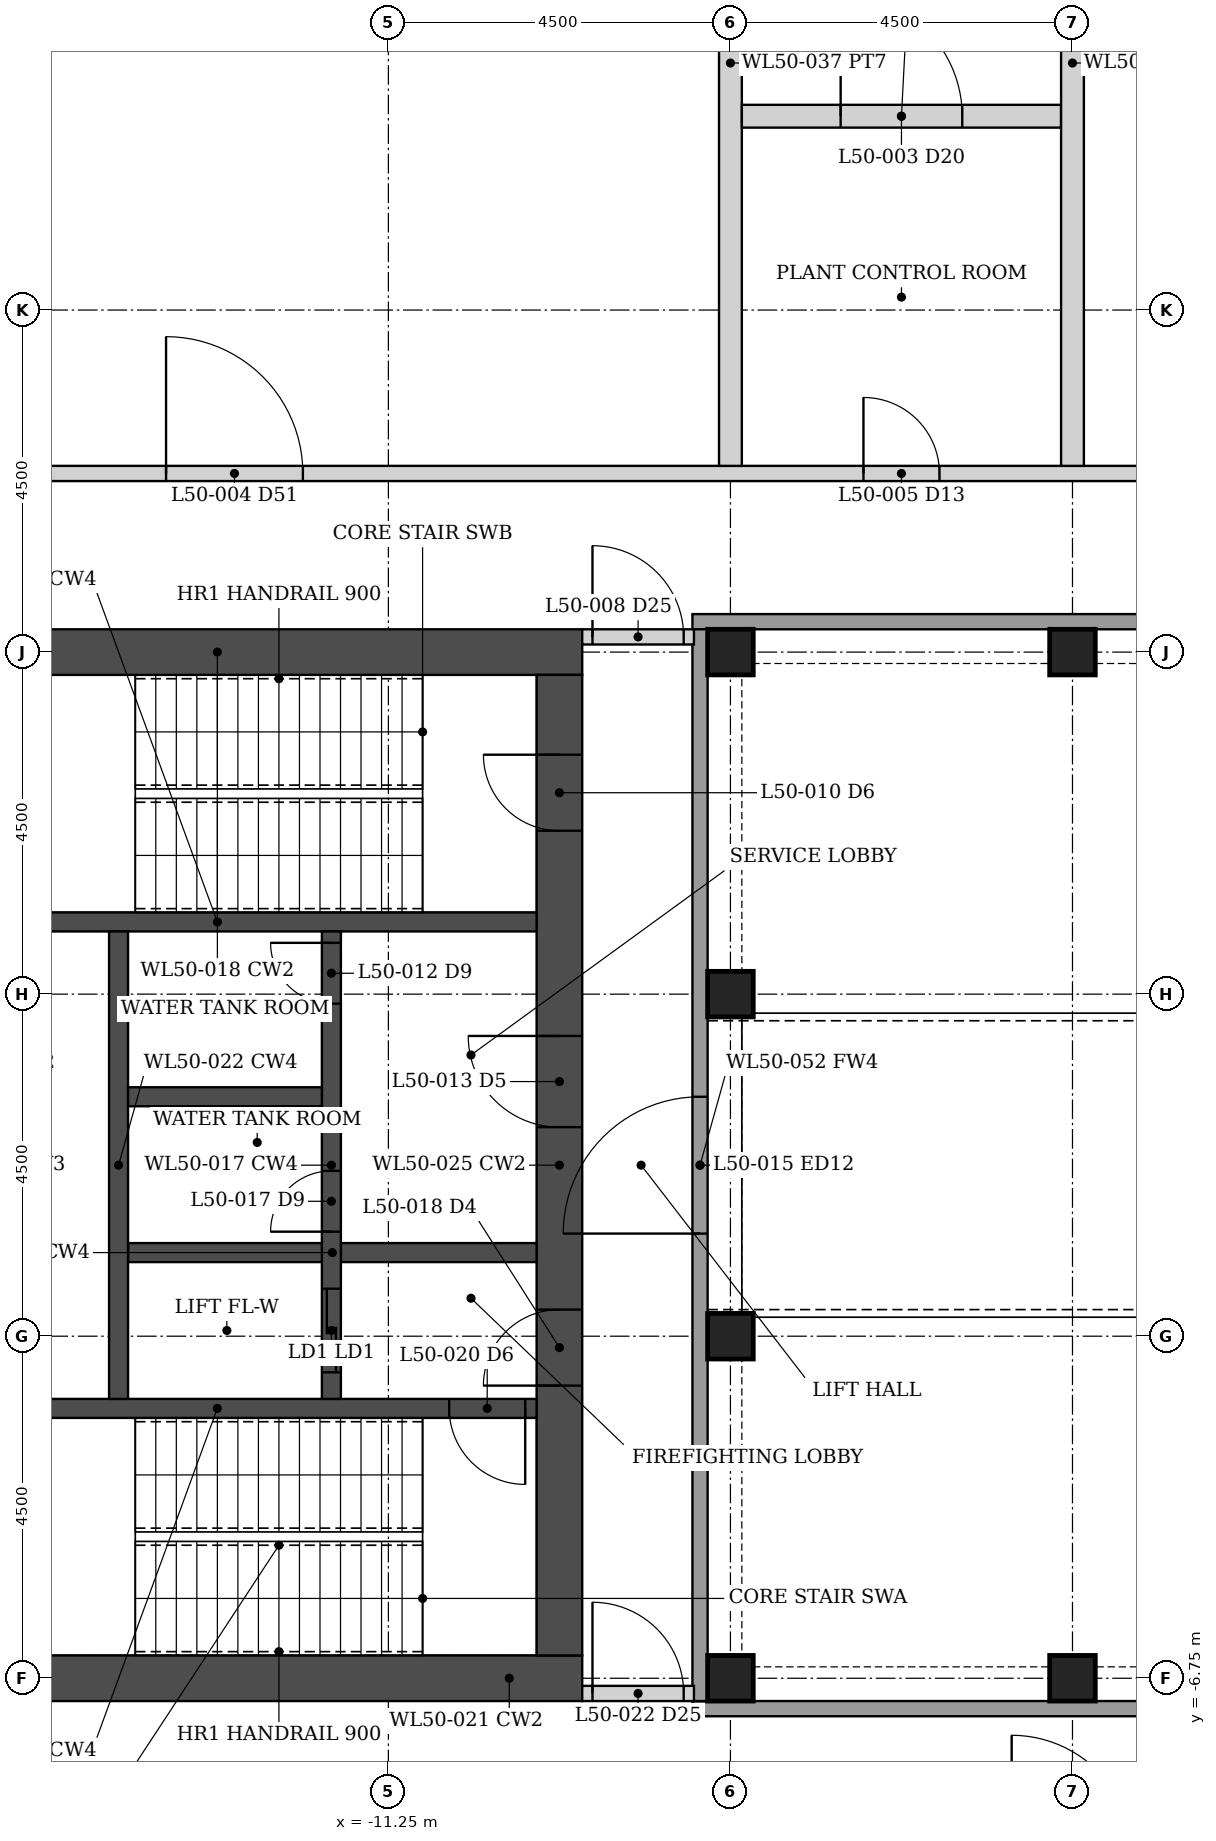
"""IFC4 building model, lengths in metres.
Left out: names, types, materials, properties, quantities, classifications, styles, units other than length and angle.
Written with IfcOpenShell. Run it as: python <this file> out.ifc"""

import sys

from ifc_helpers import new_model, si_unit, direction, frame, frame_2d, origin, origin_2d, place, context, subcontext, project, spatial, rectangle, hollow_rectangle, extrude, element, fill, save


model = new_model("IFC4")
c1 = context("Model", 3, precision=1e-05, world=origin(), true_north=direction((0.0, 1.0)))
c2 = subcontext(c1, "Body", "Model", "MODEL_VIEW")
j1 = project(units=[si_unit("LENGTHUNIT", "METRE"), si_unit("PLANEANGLEUNIT", "RADIAN")], contexts=[c1])
p1 = place(None, origin())
s1 = spatial("IfcSite", under=j1, at=p1, CompositionType="ELEMENT")
p2 = place(p1, origin())
s2 = spatial("IfcBuilding", under=s1, at=p2, CompositionType="ELEMENT")
p3 = place(p2, frame((0.0, 0.0, 190.4)))
s3 = spatial("IfcBuildingStorey", under=s2, at=p3, CompositionType="ELEMENT", Elevation=190.4)
for number, where, z_axis, x_axis in (
    (1, (-6.75, -6.75, 0.0), (0.0, 0.0, 1.0), (1.0, 0.0, 0.0)),
    (2, (-6.75, -2.25, 0.0), (0.0, 0.0, 1.0), (1.0, 0.0, 0.0)),
    (3, (-6.75, 2.25, 0.0), (0.0, 0.0, 1.0), (1.0, 0.0, 0.0)),
    (4, (-6.75, 6.75, 0.0), (0.0, 0.0, 1.0), (1.0, 0.0, 0.0)),
    (5, (-2.25, -6.75, 0.0), (0.0, 0.0, 1.0), (1.0, 0.0, 0.0)),
    (6, (-2.25, 6.75, 0.0), (0.0, 0.0, 1.0), (1.0, 0.0, 0.0)),
):
    element("IfcColumn", number, at=place(p3, frame(where, z_axis=z_axis, x_axis=x_axis)), inside=s3, PredefinedType="COLUMN", context=c2, shape_type="SweptSolid", body=[
        extrude(hollow_rectangle(XDim=0.6, YDim=0.6, WallThickness=0.03, at=origin_2d()), origin(), (0.0, 0.0, 1.0), 5.4),
    ])
for number, where, z_axis, x_axis in (
    (7, (-8.7, -6.75, 0.0), (0.0, 0.0, 1.0), (-1.0, 0.0, 0.0)),
    (8, (-8.7, 6.75, 0.0), (0.0, 0.0, 1.0), (-1.0, 0.0, 0.0)),
):
    element("IfcWall", number, at=place(p3, frame(where, z_axis=z_axis, x_axis=x_axis)), inside=s3, PredefinedType="SHEAR", context=c2, shape_type="SweptSolid", body=[
        extrude(rectangle(XDim=9.6, YDim=0.6, at=frame_2d((4.8, 0.0))), origin(), (0.0, 0.0, 1.0), 5.4),
    ])
p4 = place(p3, frame((-9.0, -6.45, 0.0), z_axis=(0.0, 0.0, 1.0), x_axis=(0.0, 1.0, 0.0)))
e9 = element("IfcWall", 9, at=p4, inside=s3, PredefinedType="SHEAR", context=c2, shape_type="SweptSolid", body=[
    extrude(rectangle(XDim=12.9, YDim=0.6, at=frame_2d((6.45, 0.0))), origin(), (0.0, 0.0, 1.0), 5.4),
])
p5 = place(p4, frame((3.55, 0.0, 0.0)))
e10 = element("IfcOpeningElement", 10, at=p5, cuts=e9, PredefinedType="OPENING", context=c2, shape_type="SweptSolid", body=[
    extrude(rectangle(XDim=1.0, YDim=2.1, at=frame_2d((0.5, 1.05))), frame((0.0, 0.31, 0.0), z_axis=(0.0, -1.0, 0.0), x_axis=(1.0, 0.0, 0.0)), (0.0, 0.0, 1.0), 0.62),
])
p6 = place(p4, frame((6.95, 0.0, 0.0)))
e11 = element("IfcOpeningElement", 11, at=p6, cuts=e9, PredefinedType="OPENING", context=c2, shape_type="SweptSolid", body=[
    extrude(rectangle(XDim=1.2, YDim=2.1, at=frame_2d((0.6, 1.05))), frame((0.0, 0.31, 0.0), z_axis=(0.0, -1.0, 0.0), x_axis=(1.0, 0.0, 0.0)), (0.0, 0.0, 1.0), 0.62),
])
p7 = place(p4, frame((10.85, 0.0, 0.0)))
e12 = element("IfcOpeningElement", 12, at=p7, cuts=e9, PredefinedType="OPENING", context=c2, shape_type="SweptSolid", body=[
    extrude(rectangle(XDim=1.0, YDim=2.1, at=frame_2d((0.5, 1.05))), frame((0.0, 0.31, 0.0), z_axis=(0.0, -1.0, 0.0), x_axis=(1.0, 0.0, 0.0)), (0.0, 0.0, 1.0), 0.62),
])
p8 = place(p3, frame((-9.3, -3.2, 0.0), z_axis=(0.0, 0.0, 1.0), x_axis=(-1.0, 0.0, 0.0)))
e13 = element("IfcWall", 13, at=p8, inside=s3, PredefinedType="SHEAR", context=c2, shape_type="SweptSolid", body=[
    extrude(rectangle(XDim=8.4, YDim=0.25, at=frame_2d((4.2, 0.0))), origin(), (0.0, 0.0, 1.0), 5.4),
])
p9 = place(p8, frame((0.15, 0.0, 0.0)))
e14 = element("IfcOpeningElement", 14, at=p9, cuts=e13, PredefinedType="OPENING", context=c2, shape_type="SweptSolid", body=[
    extrude(rectangle(XDim=1.0, YDim=2.1, at=frame_2d((0.5, 1.05))), frame((0.0, 0.135, 0.0), z_axis=(0.0, -1.0, 0.0), x_axis=(1.0, 0.0, 0.0)), (0.0, 0.0, 1.0), 0.27),
])
p10 = place(p3, frame((-9.3, 3.2, 0.0), z_axis=(0.0, 0.0, 1.0), x_axis=(-1.0, 0.0, 0.0)))
e15 = element("IfcWall", 15, at=p10, inside=s3, PredefinedType="SHEAR", context=c2, shape_type="SweptSolid", body=[
    extrude(rectangle(XDim=8.4, YDim=0.25, at=frame_2d((4.2, 0.0))), origin(), (0.0, 0.0, 1.0), 5.4),
])
p11 = place(p3, frame((-9.3, -1.15, 0.0), z_axis=(0.0, 0.0, 1.0), x_axis=(-1.0, 0.0, 0.0)))
e16 = element("IfcWall", 16, at=p11, inside=s3, PredefinedType="SHEAR", context=c2, shape_type="SweptSolid", body=[
    extrude(rectangle(XDim=5.375, YDim=0.25, at=frame_2d((2.688, 0.0))), origin(), (0.0, 0.0, 1.0), 5.4),
])
p12 = place(p3, frame((-12.0, -3.075, 0.0), z_axis=(0.0, 0.0, 1.0), x_axis=(0.0, 1.0, 0.0)))
e17 = element("IfcWall", 17, at=p12, inside=s3, PredefinedType="SHEAR", context=c2, shape_type="SweptSolid", body=[
    extrude(rectangle(XDim=6.15, YDim=0.25, at=frame_2d((3.075, 0.0))), origin(), (0.0, 0.0, 1.0), 5.4),
])
p13 = place(p12, frame((2.2, 0.0, 0.0)))
e18 = element("IfcOpeningElement", 18, at=p13, cuts=e17, PredefinedType="OPENING", context=c2, shape_type="SweptSolid", body=[
    extrude(rectangle(XDim=0.8, YDim=2.1, at=frame_2d((0.4, 1.05))), frame((0.0, 0.135, 0.0), z_axis=(0.0, -1.0, 0.0), x_axis=(1.0, 0.0, 0.0)), (0.0, 0.0, 1.0), 0.27),
])
p14 = place(p12, frame((5.2, 0.0, 0.0)))
e19 = element("IfcOpeningElement", 19, at=p14, cuts=e17, PredefinedType="OPENING", context=c2, shape_type="SweptSolid", body=[
    extrude(rectangle(XDim=0.8, YDim=2.1, at=frame_2d((0.4, 1.05))), frame((0.0, 0.135, 0.0), z_axis=(0.0, -1.0, 0.0), x_axis=(1.0, 0.0, 0.0)), (0.0, 0.0, 1.0), 0.27),
])
p15 = place(p12, frame((0.35, 0.0, 0.0)))
e20 = element("IfcOpeningElement", 20, at=p15, cuts=e17, PredefinedType="OPENING", context=c2, shape_type="SweptSolid", body=[
    extrude(rectangle(XDim=1.1, YDim=2.1, at=frame_2d((0.55, 1.05))), frame((0.0, 0.135, 0.0), z_axis=(0.0, -1.0, 0.0), x_axis=(1.0, 0.0, 0.0)), (0.0, 0.0, 1.0), 0.27),
])
p16 = place(p3, frame((-14.8, -3.075, 0.0), z_axis=(0.0, 0.0, 1.0), x_axis=(0.0, 1.0, 0.0)))
e21 = element("IfcWall", 21, at=p16, inside=s3, PredefinedType="SHEAR", context=c2, shape_type="SweptSolid", body=[
    extrude(rectangle(XDim=6.15, YDim=0.25, at=frame_2d((3.075, 0.0))), origin(), (0.0, 0.0, 1.0), 5.4),
])
p17 = place(p3, frame((-12.125, 0.9, 0.0), z_axis=(0.0, 0.0, 1.0), x_axis=(-1.0, 0.0, 0.0)))
e22 = element("IfcWall", 22, at=p17, inside=s3, PredefinedType="SHEAR", context=c2, shape_type="SweptSolid", body=[
    extrude(rectangle(XDim=2.55, YDim=0.25, at=frame_2d((1.275, 0.0))), origin(), (0.0, 0.0, 1.0), 5.4),
])
p18 = place(p3, frame((-19.9, 11.105, 0.0), z_axis=(0.0, 0.0, 1.0), x_axis=(0.707106781187, 0.707106781187, 0.0)))
e23 = element("IfcWall", 23, at=p18, inside=s3, PredefinedType="SOLIDWALL", context=c2, shape_type="SweptSolid", body=[
    extrude(rectangle(XDim=12.438, YDim=0.2, at=frame_2d((6.219, 0.0))), origin(), (0.0, 0.0, 1.0), 4.299),
])
for number, where, z_axis, x_axis in (
    (24, (-7.25, 7.15, 0.0), (0.0, 0.0, 1.0), (1.0, 0.0, 0.0)),
    (25, (-7.25, -7.15, 0.0), (0.0, 0.0, 1.0), (1.0, 0.0, 0.0)),
):
    element("IfcWall", number, at=place(p3, frame(where, z_axis=z_axis, x_axis=x_axis)), inside=s3, PredefinedType="SOLIDWALL", context=c2, shape_type="SweptSolid", body=[
        extrude(rectangle(XDim=14.5, YDim=0.2, at=frame_2d((7.25, 0.0))), origin(), (0.0, 0.0, 1.0), 4.229),
    ])
p19 = place(p3, frame((-7.15, -7.05, 0.0), z_axis=(0.0, 0.0, 1.0), x_axis=(0.0, 1.0, 0.0)))
e26 = element("IfcWall", 26, at=p19, inside=s3, PredefinedType="SOLIDWALL", context=c2, shape_type="SweptSolid", body=[
    extrude(rectangle(XDim=14.1, YDim=0.2, at=frame_2d((7.05, 0.0))), origin(), (0.0, 0.0, 1.0), 4.229),
])
p20 = place(p19, frame((6.15, 0.0, 0.0)))
e27 = element("IfcOpeningElement", 27, at=p20, cuts=e26, PredefinedType="OPENING", context=c2, shape_type="SweptSolid", body=[
    extrude(rectangle(XDim=1.8, YDim=2.2, at=frame_2d((0.9, 1.1))), frame((0.0, 0.11, 0.0), z_axis=(0.0, -1.0, 0.0), x_axis=(1.0, 0.0, 0.0)), (0.0, 0.0, 1.0), 0.22),
])
p21 = place(p3, frame((-8.7, 6.95, 0.0), z_axis=(0.0, 0.0, 1.0), x_axis=(1.0, 0.0, 0.0)))
e28 = element("IfcWall", 28, at=p21, inside=s3, PredefinedType="PARTITIONING", context=c2, shape_type="SweptSolid", body=[
    extrude(rectangle(XDim=1.47, YDim=0.2, at=frame_2d((0.735, 0.0))), origin(), (0.0, 0.0, 1.0), 4.229),
])
p22 = place(p21, frame((0.135, 0.0, 0.0)))
e29 = element("IfcOpeningElement", 29, at=p22, cuts=e28, PredefinedType="OPENING", context=c2, shape_type="SweptSolid", body=[
    extrude(rectangle(XDim=1.2, YDim=2.1, at=frame_2d((0.6, 1.05))), frame((0.0, 0.11, 0.0), z_axis=(0.0, -1.0, 0.0), x_axis=(1.0, 0.0, 0.0)), (0.0, 0.0, 1.0), 0.22),
])
p23 = place(p3, frame((-8.7, -6.95, 0.0), z_axis=(0.0, 0.0, 1.0), x_axis=(1.0, 0.0, 0.0)))
e30 = element("IfcWall", 30, at=p23, inside=s3, PredefinedType="PARTITIONING", context=c2, shape_type="SweptSolid", body=[
    extrude(rectangle(XDim=1.47, YDim=0.2, at=frame_2d((0.735, 0.0))), origin(), (0.0, 0.0, 1.0), 4.229),
])
p24 = place(p23, frame((0.135, 0.0, 0.0)))
e31 = element("IfcOpeningElement", 31, at=p24, cuts=e30, PredefinedType="OPENING", context=c2, shape_type="SweptSolid", body=[
    extrude(rectangle(XDim=1.2, YDim=2.1, at=frame_2d((0.6, 1.05))), frame((0.0, 0.11, 0.0), z_axis=(0.0, -1.0, 0.0), x_axis=(1.0, 0.0, 0.0)), (0.0, 0.0, 1.0), 0.22),
])
p25 = place(p3, frame((-19.8, 9.1, 0.0), z_axis=(0.0, 0.0, 1.0), x_axis=(1.0, 0.0, 0.0)))
e32 = element("IfcWall", 32, at=p25, inside=s3, PredefinedType="PARTITIONING", context=c2, shape_type="SweptSolid", body=[
    extrude(rectangle(XDim=39.6, YDim=0.2, at=frame_2d((19.8, 0.0))), origin(), (0.0, 0.0, 1.0), 4.229),
])
p26 = place(p25, frame((5.625, 0.0, 0.0)))
e33 = element("IfcOpeningElement", 33, at=p26, cuts=e32, PredefinedType="OPENING", context=c2, shape_type="SweptSolid", body=[
    extrude(rectangle(XDim=1.8, YDim=2.1, at=frame_2d((0.9, 1.05))), frame((0.0, 0.11, 0.0), z_axis=(0.0, -1.0, 0.0), x_axis=(1.0, 0.0, 0.0)), (0.0, 0.0, 1.0), 0.22),
])
p27 = place(p25, frame((14.8, 0.0, 0.0)))
e34 = element("IfcOpeningElement", 34, at=p27, cuts=e32, PredefinedType="OPENING", context=c2, shape_type="SweptSolid", body=[
    extrude(rectangle(XDim=1.0, YDim=2.1, at=frame_2d((0.5, 1.05))), frame((0.0, 0.11, 0.0), z_axis=(0.0, -1.0, 0.0), x_axis=(1.0, 0.0, 0.0)), (0.0, 0.0, 1.0), 0.22),
])
p28 = place(p25, frame((21.25, 0.0, 0.0)))
e35 = element("IfcOpeningElement", 35, at=p28, cuts=e32, PredefinedType="OPENING", context=c2, shape_type="SweptSolid", body=[
    extrude(rectangle(XDim=1.6, YDim=2.4, at=frame_2d((0.8, 1.2))), frame((0.0, 0.11, 0.0), z_axis=(0.0, -1.0, 0.0), x_axis=(1.0, 0.0, 0.0)), (0.0, 0.0, 1.0), 0.22),
])
p29 = place(p25, frame((32.175, 0.0, 0.0)))
e36 = element("IfcOpeningElement", 36, at=p29, cuts=e32, PredefinedType="OPENING", context=c2, shape_type="SweptSolid", body=[
    extrude(rectangle(XDim=1.8, YDim=2.1, at=frame_2d((0.9, 1.05))), frame((0.0, 0.11, 0.0), z_axis=(0.0, -1.0, 0.0), x_axis=(1.0, 0.0, 0.0)), (0.0, 0.0, 1.0), 0.22),
])
p30 = place(p3, frame((-6.75, 9.2, 0.0), z_axis=(0.0, 0.0, 1.0), x_axis=(0.0, 1.0, 0.0)))
e37 = element("IfcWall", 37, at=p30, inside=s3, PredefinedType="PARTITIONING", context=c2, shape_type="SweptSolid", body=[
    extrude(rectangle(XDim=10.6, YDim=0.3, at=frame_2d((5.3, 0.0))), origin(), (0.0, 0.0, 1.0), 4.229),
])
p31 = place(p3, frame((-6.6, 13.8, 0.0), z_axis=(0.0, 0.0, 1.0), x_axis=(1.0, 0.0, 0.0)))
e38 = element("IfcWall", 38, at=p31, inside=s3, PredefinedType="PARTITIONING", context=c2, shape_type="SweptSolid", body=[
    extrude(rectangle(XDim=4.2, YDim=0.3, at=frame_2d((2.1, 0.0))), origin(), (0.0, 0.0, 1.0), 4.229),
])
p32 = place(p31, frame((1.3, 0.0, 0.0)))
e39 = element("IfcOpeningElement", 39, at=p32, cuts=e38, PredefinedType="OPENING", context=c2, shape_type="SweptSolid", body=[
    extrude(rectangle(XDim=1.6, YDim=2.4, at=frame_2d((0.8, 1.2))), frame((0.0, 0.16, 0.0), z_axis=(0.0, -1.0, 0.0), x_axis=(1.0, 0.0, 0.0)), (0.0, 0.0, 1.0), 0.32),
])
p33 = place(p3, frame((-2.25, 9.2, 0.0), z_axis=(0.0, 0.0, 1.0), x_axis=(0.0, 1.0, 0.0)))
e40 = element("IfcWall", 40, at=p33, inside=s3, PredefinedType="PARTITIONING", context=c2, shape_type="SweptSolid", body=[
    extrude(rectangle(XDim=10.6, YDim=0.3, at=frame_2d((5.3, 0.0))), origin(), (0.0, 0.0, 1.0), 4.229),
])
p34 = place(p20, origin())
e41 = element("IfcDoor", 41, at=p34, inside=s3, OperationType="DOUBLE_DOOR_SLIDING", PredefinedType="DOOR", context=c2, shape_type="SweptSolid", body=[
    extrude(rectangle(XDim=1.8, YDim=2.2, at=frame_2d((0.9, 1.1))), frame((0.0, 0.025, 0.0), z_axis=(0.0, -1.0, 0.0), x_axis=(1.0, 0.0, 0.0)), (0.0, 0.0, 1.0), 0.05),
])
fill(e27, e41)
p35 = place(p22, origin())
e42 = element("IfcDoor", 42, at=p35, inside=s3, OperationType="DOUBLE_DOOR_DOUBLE_SWING", PredefinedType="DOOR", context=c2, shape_type="SweptSolid", body=[
    extrude(rectangle(XDim=1.2, YDim=2.1, at=frame_2d((0.6, 1.05))), frame((0.0, 0.025, 0.0), z_axis=(0.0, -1.0, 0.0), x_axis=(1.0, 0.0, 0.0)), (0.0, 0.0, 1.0), 0.05),
])
fill(e29, e42)
p36 = place(p24, origin())
e43 = element("IfcDoor", 43, at=p36, inside=s3, OperationType="DOUBLE_DOOR_DOUBLE_SWING", PredefinedType="DOOR", context=c2, shape_type="SweptSolid", body=[
    extrude(rectangle(XDim=1.2, YDim=2.1, at=frame_2d((0.6, 1.05))), frame((0.0, 0.025, 0.0), z_axis=(0.0, -1.0, 0.0), x_axis=(1.0, 0.0, 0.0)), (0.0, 0.0, 1.0), 0.05),
])
fill(e31, e43)
p37 = place(p26, origin())
e44 = element("IfcDoor", 44, at=p37, inside=s3, OperationType="SINGLE_SWING_LEFT", PredefinedType="DOOR", context=c2, shape_type="SweptSolid", body=[
    extrude(rectangle(XDim=1.8, YDim=2.1, at=frame_2d((0.9, 1.05))), frame((0.0, 0.025, 0.0), z_axis=(0.0, -1.0, 0.0), x_axis=(1.0, 0.0, 0.0)), (0.0, 0.0, 1.0), 0.05),
])
fill(e33, e44)
p38 = place(p27, origin())
e45 = element("IfcDoor", 45, at=p38, inside=s3, OperationType="SINGLE_SWING_LEFT", PredefinedType="DOOR", context=c2, shape_type="SweptSolid", body=[
    extrude(rectangle(XDim=1.0, YDim=2.1, at=frame_2d((0.5, 1.05))), frame((0.0, 0.025, 0.0), z_axis=(0.0, -1.0, 0.0), x_axis=(1.0, 0.0, 0.0)), (0.0, 0.0, 1.0), 0.05),
])
fill(e34, e45)
p39 = place(p32, origin())
e46 = element("IfcDoor", 46, at=p39, inside=s3, OperationType="SINGLE_SWING_LEFT", PredefinedType="DOOR", context=c2, shape_type="SweptSolid", body=[
    extrude(rectangle(XDim=1.6, YDim=2.4, at=frame_2d((0.8, 1.2))), frame((0.0, 0.025, 0.0), z_axis=(0.0, -1.0, 0.0), x_axis=(1.0, 0.0, 0.0)), (0.0, 0.0, 1.0), 0.05),
])
fill(e39, e46)
p40 = place(p5, origin())
e47 = element("IfcDoor", 47, at=p40, inside=s3, OperationType="SINGLE_SWING_LEFT", PredefinedType="DOOR", context=c2, shape_type="SweptSolid", body=[
    extrude(rectangle(XDim=1.0, YDim=2.1, at=frame_2d((0.5, 1.05))), frame((0.0, 0.025, 0.0), z_axis=(0.0, -1.0, 0.0), x_axis=(1.0, 0.0, 0.0)), (0.0, 0.0, 1.0), 0.05),
])
fill(e10, e47)
p41 = place(p9, origin())
e48 = element("IfcDoor", 48, at=p41, inside=s3, OperationType="SINGLE_SWING_LEFT", PredefinedType="DOOR", context=c2, shape_type="SweptSolid", body=[
    extrude(rectangle(XDim=1.0, YDim=2.1, at=frame_2d((0.5, 1.05))), frame((0.0, 0.025, 0.0), z_axis=(0.0, -1.0, 0.0), x_axis=(1.0, 0.0, 0.0)), (0.0, 0.0, 1.0), 0.05),
])
fill(e14, e48)
p42 = place(p6, origin())
e49 = element("IfcDoor", 49, at=p42, inside=s3, OperationType="SINGLE_SWING_RIGHT", PredefinedType="DOOR", context=c2, shape_type="SweptSolid", body=[
    extrude(rectangle(XDim=1.2, YDim=2.1, at=frame_2d((0.6, 1.05))), frame((0.0, 0.025, 0.0), z_axis=(0.0, -1.0, 0.0), x_axis=(1.0, 0.0, 0.0)), (0.0, 0.0, 1.0), 0.05),
])
fill(e11, e49)
p43 = place(p13, origin())
e50 = element("IfcDoor", 50, at=p43, inside=s3, OperationType="SINGLE_SWING_LEFT", PredefinedType="DOOR", context=c2, shape_type="SweptSolid", body=[
    extrude(rectangle(XDim=0.8, YDim=2.1, at=frame_2d((0.4, 1.05))), frame((0.0, 0.025, 0.0), z_axis=(0.0, -1.0, 0.0), x_axis=(1.0, 0.0, 0.0)), (0.0, 0.0, 1.0), 0.05),
])
fill(e18, e50)
p44 = place(p14, origin())
e51 = element("IfcDoor", 51, at=p44, inside=s3, OperationType="SINGLE_SWING_RIGHT", PredefinedType="DOOR", context=c2, shape_type="SweptSolid", body=[
    extrude(rectangle(XDim=0.8, YDim=2.1, at=frame_2d((0.4, 1.05))), frame((0.0, 0.025, 0.0), z_axis=(0.0, -1.0, 0.0), x_axis=(1.0, 0.0, 0.0)), (0.0, 0.0, 1.0), 0.05),
])
fill(e19, e51)
p45 = place(p7, origin())
e52 = element("IfcDoor", 52, at=p45, inside=s3, OperationType="SINGLE_SWING_RIGHT", PredefinedType="DOOR", context=c2, shape_type="SweptSolid", body=[
    extrude(rectangle(XDim=1.0, YDim=2.1, at=frame_2d((0.5, 1.05))), frame((0.0, 0.025, 0.0), z_axis=(0.0, -1.0, 0.0), x_axis=(1.0, 0.0, 0.0)), (0.0, 0.0, 1.0), 0.05),
])
fill(e12, e52)
p46 = place(p15, origin())
e53 = element("IfcDoor", 53, at=p46, inside=s3, OperationType="DOUBLE_DOOR_SLIDING", PredefinedType="DOOR", context=c2, shape_type="SweptSolid", body=[
    extrude(rectangle(XDim=1.1, YDim=2.1, at=frame_2d((0.55, 1.05))), frame((0.0, 0.025, 0.0), z_axis=(0.0, -1.0, 0.0), x_axis=(1.0, 0.0, 0.0)), (0.0, 0.0, 1.0), 0.05),
])
fill(e20, e53)
save(model, sys.argv[1])
